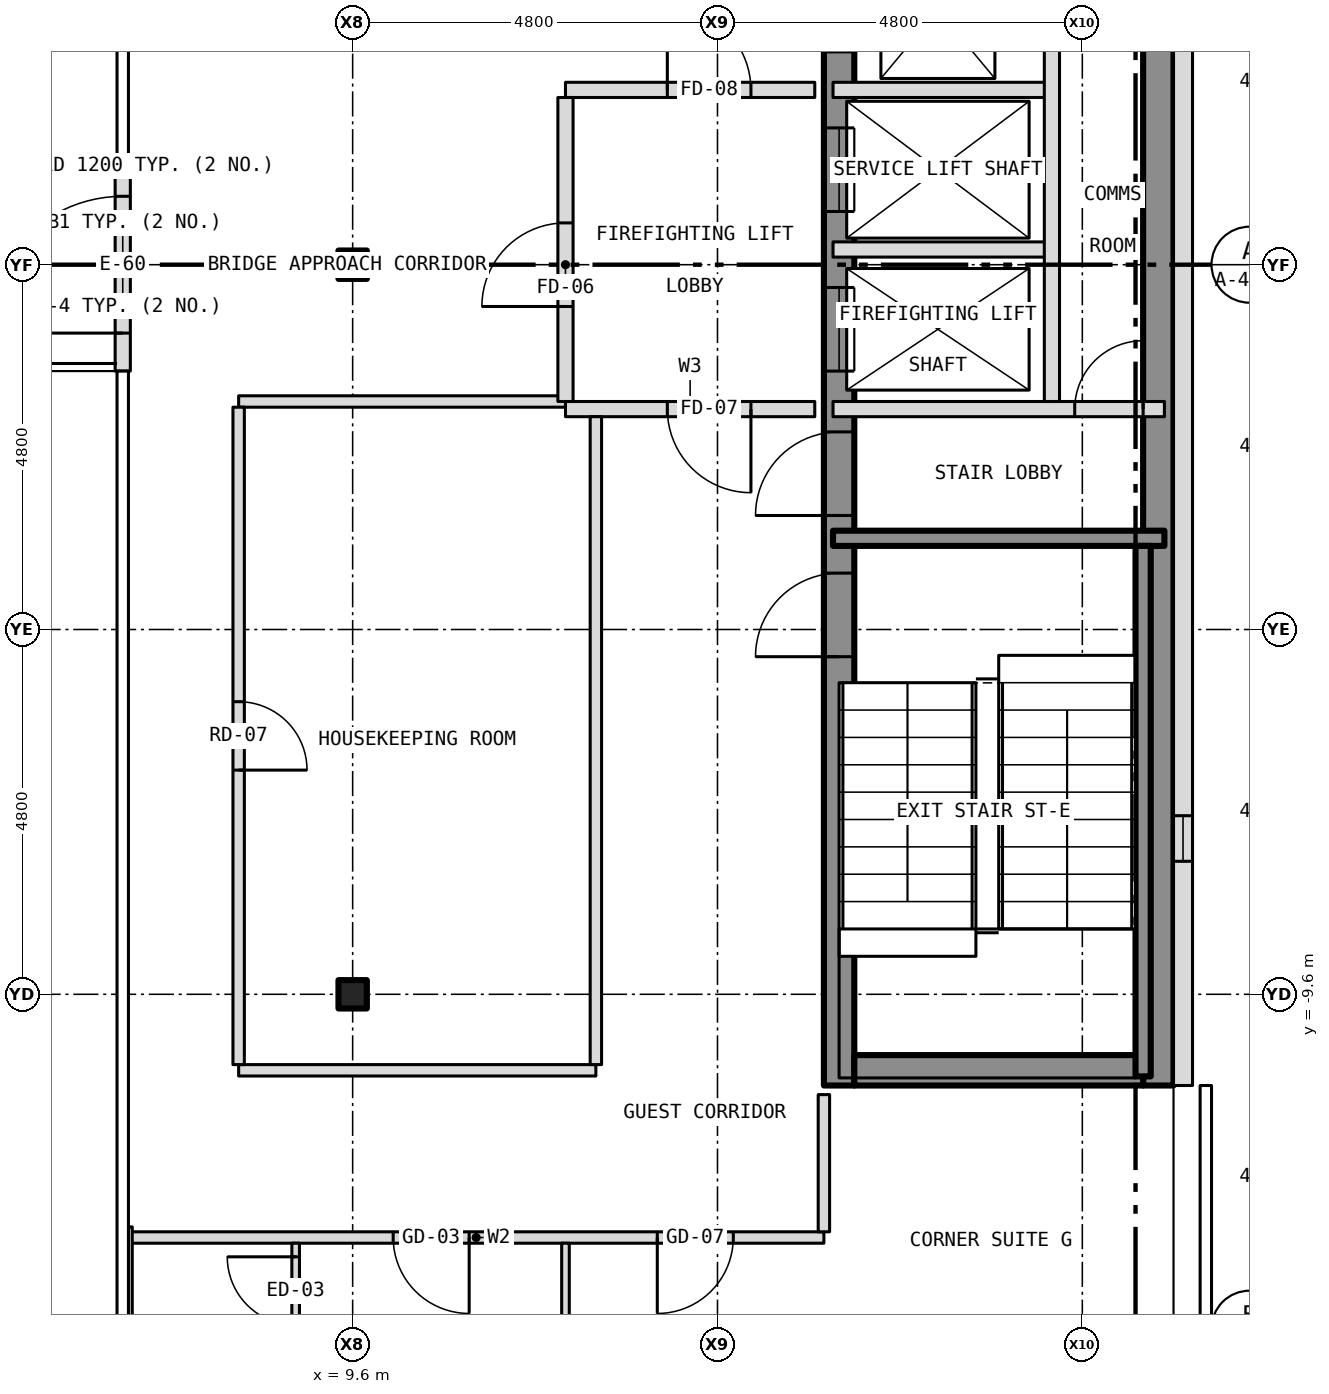
"""IFC4 building model, lengths in metres.
Left out: names, types, materials, properties, quantities, classifications, styles, units other than length and angle.
Written with IfcOpenShell. Run it as: python <this file> out.ifc"""

import sys

from ifc_helpers import new_model, si_unit, direction, frame, frame_2d, origin, origin_2d, place, context, subcontext, project, spatial, rectangle, i_section, extrude, element, fill, save


model = new_model("IFC4")
c1 = context("Model", 3, precision=1e-05, world=origin(), true_north=direction((0.0, 1.0)))
c2 = subcontext(c1, "Body", "Model", "MODEL_VIEW")
j1 = project(units=[si_unit("LENGTHUNIT", "METRE"), si_unit("PLANEANGLEUNIT", "RADIAN")], contexts=[c1])
p1 = place(None, origin())
s1 = spatial("IfcSite", under=j1, at=p1, CompositionType="ELEMENT")
p2 = place(p1, origin())
s2 = spatial("IfcBuilding", under=s1, at=p2, CompositionType="ELEMENT")
p3 = place(p2, frame((0.0, 0.0, 226.0)))
s3 = spatial("IfcBuildingStorey", under=s2, at=p3, CompositionType="ELEMENT", Elevation=226.0)
for number, where, z_axis, x_axis in (
    (1, (9.6, -9.6, -0.15), (0.0, 0.0, 1.0), (1.0, 0.0, 0.0)),
    (2, (9.6, 0.0, -0.15), (0.0, 0.0, 1.0), (1.0, 0.0, 0.0)),
):
    element("IfcColumn", number, at=place(p3, frame(where, z_axis=z_axis, x_axis=x_axis)), inside=s3, PredefinedType="COLUMN", context=c2, shape_type="SweptSolid", body=[
        extrude(i_section(OverallWidth=0.373, OverallDepth=0.373, WebThickness=0.016, FlangeThickness=0.026, at=origin_2d()), origin(), (0.0, 0.0, 1.0), 3.5),
    ])
p4 = place(p3, frame((16.0, -10.8, 0.0), z_axis=(0.0, 0.0, 1.0), x_axis=(0.0, 1.0, 0.0)))
e3 = element("IfcWall", 3, at=p4, inside=s3, PredefinedType="SHEAR", context=c2, shape_type="SweptSolid", body=[
    extrude(rectangle(XDim=21.6, YDim=0.4, at=frame_2d((10.8, 0.0))), origin(), (0.0, 0.0, 1.0), 3.25),
])
p5 = place(p4, frame((9.4, 0.0, 0.0)))
e4 = element("IfcOpeningElement", 4, at=p5, cuts=e3, PredefinedType="OPENING", context=c2, shape_type="SweptSolid", body=[
    extrude(rectangle(XDim=1.1, YDim=2.1, at=frame_2d((0.55, 1.05))), frame((0.0, 0.212, 0.0), z_axis=(0.0, -1.0, 0.0), x_axis=(1.0, 0.0, 0.0)), (0.0, 0.0, 1.0), 0.424),
])
p6 = place(p4, frame((11.5, 0.0, 0.0)))
e5 = element("IfcOpeningElement", 5, at=p6, cuts=e3, PredefinedType="OPENING", context=c2, shape_type="SweptSolid", body=[
    extrude(rectangle(XDim=1.1, YDim=2.1, at=frame_2d((0.55, 1.05))), frame((0.0, 0.212, 0.0), z_axis=(0.0, -1.0, 0.0), x_axis=(1.0, 0.0, 0.0)), (0.0, 0.0, 1.0), 0.424),
])
p7 = place(p4, frame((13.6, 0.0, 0.0)))
e6 = element("IfcOpeningElement", 6, at=p7, cuts=e3, PredefinedType="OPENING", context=c2, shape_type="SweptSolid", body=[
    extrude(rectangle(XDim=1.1, YDim=2.1, at=frame_2d((0.55, 1.05))), frame((0.0, 0.212, 0.0), z_axis=(0.0, -1.0, 0.0), x_axis=(1.0, 0.0, 0.0)), (0.0, 0.0, 1.0), 0.424),
])
p8 = place(p4, frame((15.7, 0.0, 0.0)))
e7 = element("IfcOpeningElement", 7, at=p8, cuts=e3, PredefinedType="OPENING", context=c2, shape_type="SweptSolid", body=[
    extrude(rectangle(XDim=1.1, YDim=2.1, at=frame_2d((0.55, 1.05))), frame((0.0, 0.212, 0.0), z_axis=(0.0, -1.0, 0.0), x_axis=(1.0, 0.0, 0.0)), (0.0, 0.0, 1.0), 0.424),
])
p9 = place(p4, frame((17.8, 0.0, 0.0)))
e8 = element("IfcOpeningElement", 8, at=p9, cuts=e3, PredefinedType="OPENING", context=c2, shape_type="SweptSolid", body=[
    extrude(rectangle(XDim=1.1, YDim=2.1, at=frame_2d((0.55, 1.05))), frame((0.0, 0.212, 0.0), z_axis=(0.0, -1.0, 0.0), x_axis=(1.0, 0.0, 0.0)), (0.0, 0.0, 1.0), 0.424),
])
p10 = place(p4, frame((5.642, 0.0, 0.0)))
e9 = element("IfcOpeningElement", 9, at=p10, cuts=e3, PredefinedType="OPENING", context=c2, shape_type="SweptSolid", body=[
    extrude(rectangle(XDim=1.1, YDim=2.1, at=frame_2d((0.55, 1.05))), frame((0.0, 0.212, 0.0), z_axis=(0.0, -1.0, 0.0), x_axis=(1.0, 0.0, 0.0)), (0.0, 0.0, 1.0), 0.424),
])
p11 = place(p4, frame((7.5, 0.0, 0.0)))
e10 = element("IfcOpeningElement", 10, at=p11, cuts=e3, PredefinedType="OPENING", context=c2, shape_type="SweptSolid", body=[
    extrude(rectangle(XDim=1.1, YDim=2.1, at=frame_2d((0.55, 1.05))), frame((0.0, 0.212, 0.0), z_axis=(0.0, -1.0, 0.0), x_axis=(1.0, 0.0, 0.0)), (0.0, 0.0, 1.0), 0.424),
])
p12 = place(p4, frame((20.0, 0.0, 0.0)))
e11 = element("IfcOpeningElement", 11, at=p12, cuts=e3, PredefinedType="OPENING", context=c2, shape_type="SweptSolid", body=[
    extrude(rectangle(XDim=0.9, YDim=2.1, at=frame_2d((0.45, 1.05))), frame((0.0, 0.212, 0.0), z_axis=(0.0, -1.0, 0.0), x_axis=(1.0, 0.0, 0.0)), (0.0, 0.0, 1.0), 0.424),
])
p13 = place(p3, frame((20.2, -10.8, 0.0), z_axis=(0.0, 0.0, 1.0), x_axis=(0.0, 1.0, 0.0)))
e12 = element("IfcWall", 12, at=p13, inside=s3, PredefinedType="SHEAR", context=c2, shape_type="SweptSolid", body=[
    extrude(rectangle(XDim=21.6, YDim=0.4, at=frame_2d((10.8, 0.0))), origin(), (0.0, 0.0, 1.0), 3.25),
])
p14 = place(p3, frame((16.2, -10.6, 0.0), z_axis=(0.0, 0.0, 1.0), x_axis=(1.0, 0.0, 0.0)))
e13 = element("IfcWall", 13, at=p14, inside=s3, PredefinedType="SHEAR", context=c2, shape_type="SweptSolid", body=[
    extrude(rectangle(XDim=3.8, YDim=0.4, at=frame_2d((1.9, 0.0))), origin(), (0.0, 0.0, 1.0), 3.25),
])
p15 = place(p3, frame((20.525, -10.8, 0.0), z_axis=(0.0, 0.0, 1.0), x_axis=(0.0, 1.0, 0.0)))
e14 = element("IfcWall", 14, at=p15, inside=s3, PredefinedType="SOLIDWALL", context=c2, shape_type="SweptSolid", body=[
    extrude(rectangle(XDim=21.6, YDim=0.25, at=frame_2d((10.8, 0.0))), origin(), (0.0, 0.0, 1.0), 3.5),
])
p16 = place(p15, frame((2.95, 0.0, 1.0)))
e15 = element("IfcOpeningElement", 15, at=p16, cuts=e14, PredefinedType="OPENING", context=c2, shape_type="SweptSolid", body=[
    extrude(rectangle(XDim=0.6, YDim=1.5, at=frame_2d((0.3, 0.75))), frame((0.0, 0.137, 0.0), z_axis=(0.0, -1.0, 0.0), x_axis=(1.0, 0.0, 0.0)), (0.0, 0.0, 1.0), 0.274),
])
p17 = place(p3, frame((6.575, -1.4, 0.0), z_axis=(0.0, 0.0, 1.0), x_axis=(0.0, 1.0, 0.0)))
e16 = element("IfcWall", 16, at=p17, inside=s3, PredefinedType="SOLIDWALL", context=c2, shape_type="SweptSolid", body=[
    extrude(rectangle(XDim=2.8, YDim=0.2, at=frame_2d((1.4, 0.0))), origin(), (0.0, 0.0, 1.0), 3.5),
])
p18 = place(p17, frame((0.5, 0.0, 0.0)))
e17 = element("IfcOpeningElement", 17, at=p18, cuts=e16, PredefinedType="OPENING", context=c2, shape_type="SweptSolid", body=[
    extrude(rectangle(XDim=1.8, YDim=2.1, at=frame_2d((0.9, 1.05))), frame((0.0, 0.112, 0.0), z_axis=(0.0, -1.0, 0.0), x_axis=(1.0, 0.0, 0.0)), (0.0, 0.0, 1.0), 0.224),
])
p19 = place(p3, frame((6.65, -12.8, 0.0), z_axis=(0.0, 0.0, 1.0), x_axis=(1.0, 0.0, 0.0)))
e18 = element("IfcWall", 18, at=p19, inside=s3, PredefinedType="PARTITIONING", context=c2, shape_type="SweptSolid", body=[
    extrude(rectangle(XDim=9.15, YDim=0.15, at=frame_2d((4.575, 0.0))), origin(), (0.0, 0.0, 1.0), 3.35),
])
p20 = place(p19, frame((3.483, 0.0, 0.0)))
e19 = element("IfcOpeningElement", 19, at=p20, cuts=e18, PredefinedType="OPENING", context=c2, shape_type="SweptSolid", body=[
    extrude(rectangle(XDim=1.0, YDim=2.1, at=frame_2d((0.5, 1.05))), frame((0.0, 0.087, 0.0), z_axis=(0.0, -1.0, 0.0), x_axis=(1.0, 0.0, 0.0)), (0.0, 0.0, 1.0), 0.174),
])
p21 = place(p19, frame((6.958, 0.0, 0.0)))
e20 = element("IfcOpeningElement", 20, at=p21, cuts=e18, PredefinedType="OPENING", context=c2, shape_type="SweptSolid", body=[
    extrude(rectangle(XDim=1.0, YDim=2.1, at=frame_2d((0.5, 1.05))), frame((0.0, 0.087, 0.0), z_axis=(0.0, -1.0, 0.0), x_axis=(1.0, 0.0, 0.0)), (0.0, 0.0, 1.0), 0.174),
])
p22 = place(p3, frame((8.1, -10.6, 0.0), z_axis=(0.0, 0.0, 1.0), x_axis=(1.0, 0.0, 0.0)))
e21 = element("IfcWall", 21, at=p22, inside=s3, PredefinedType="PARTITIONING", context=c2, shape_type="SweptSolid", body=[
    extrude(rectangle(XDim=4.7, YDim=0.15, at=frame_2d((2.35, 0.0))), origin(), (0.0, 0.0, 1.0), 3.35),
])
p23 = place(p3, frame((15.92, -3.6, 0.0), z_axis=(0.0, 0.0, 1.0), x_axis=(1.0, 0.0, 0.0)))
e22 = element("IfcWall", 22, at=p23, inside=s3, PredefinedType="SHEAR", context=c2, shape_type="SweptSolid", body=[
    extrude(rectangle(XDim=4.36, YDim=0.2, at=frame_2d((2.18, 0.0))), origin(), (0.0, 0.0, 1.0), 3.25),
])
p24 = place(p3, frame((12.4, -1.9, 0.0), z_axis=(0.0, 0.0, 1.0), x_axis=(1.0, 0.0, 0.0)))
e23 = element("IfcWall", 23, at=p24, inside=s3, PredefinedType="PARTITIONING", context=c2, shape_type="SweptSolid", body=[
    extrude(rectangle(XDim=3.28, YDim=0.2, at=frame_2d((1.64, 0.0))), origin(), (0.0, 0.0, 1.0), 3.35),
])
p25 = place(p24, frame((1.34, 0.0, 0.0)))
e24 = element("IfcOpeningElement", 24, at=p25, cuts=e23, PredefinedType="OPENING", context=c2, shape_type="SweptSolid", body=[
    extrude(rectangle(XDim=1.1, YDim=2.1, at=frame_2d((0.55, 1.05))), frame((0.0, 0.112, 0.0), z_axis=(0.0, -1.0, 0.0), x_axis=(1.0, 0.0, 0.0)), (0.0, 0.0, 1.0), 0.224),
])
p26 = place(p3, frame((15.92, -1.9, 0.0), z_axis=(0.0, 0.0, 1.0), x_axis=(1.0, 0.0, 0.0)))
e25 = element("IfcWall", 25, at=p26, inside=s3, PredefinedType="PARTITIONING", context=c2, shape_type="SweptSolid", body=[
    extrude(rectangle(XDim=4.36, YDim=0.2, at=frame_2d((2.18, 0.0))), origin(), (0.0, 0.0, 1.0), 3.25),
])
p27 = place(p26, frame((3.18, 0.0, 0.0)))
e26 = element("IfcOpeningElement", 26, at=p27, cuts=e25, PredefinedType="OPENING", context=c2, shape_type="SweptSolid", body=[
    extrude(rectangle(XDim=0.9, YDim=2.1, at=frame_2d((0.45, 1.05))), frame((0.0, 0.112, 0.0), z_axis=(0.0, -1.0, 0.0), x_axis=(1.0, 0.0, 0.0)), (0.0, 0.0, 1.0), 0.224),
])
p28 = place(p3, frame((8.1, -1.8, 0.0), z_axis=(0.0, 0.0, 1.0), x_axis=(1.0, 0.0, 0.0)))
e27 = element("IfcWall", 27, at=p28, inside=s3, PredefinedType="PARTITIONING", context=c2, shape_type="SweptSolid", body=[
    extrude(rectangle(XDim=4.3, YDim=0.15, at=frame_2d((2.15, 0.0))), origin(), (0.0, 0.0, 1.0), 3.35),
])
p29 = place(p3, frame((15.92, 0.2, 0.0), z_axis=(0.0, 0.0, 1.0), x_axis=(1.0, 0.0, 0.0)))
e28 = element("IfcWall", 28, at=p29, inside=s3, PredefinedType="PARTITIONING", context=c2, shape_type="SweptSolid", body=[
    extrude(rectangle(XDim=2.88, YDim=0.2, at=frame_2d((1.44, 0.0))), origin(), (0.0, 0.0, 1.0), 3.25),
])
p30 = place(p3, frame((12.4, 2.3, 0.0), z_axis=(0.0, 0.0, 1.0), x_axis=(1.0, 0.0, 0.0)))
e29 = element("IfcWall", 29, at=p30, inside=s3, PredefinedType="PARTITIONING", context=c2, shape_type="SweptSolid", body=[
    extrude(rectangle(XDim=3.28, YDim=0.2, at=frame_2d((1.64, 0.0))), origin(), (0.0, 0.0, 1.0), 3.35),
])
p31 = place(p30, frame((1.34, 0.0, 0.0)))
e30 = element("IfcOpeningElement", 30, at=p31, cuts=e29, PredefinedType="OPENING", context=c2, shape_type="SweptSolid", body=[
    extrude(rectangle(XDim=1.1, YDim=2.1, at=frame_2d((0.55, 1.05))), frame((0.0, 0.112, 0.0), z_axis=(0.0, -1.0, 0.0), x_axis=(1.0, 0.0, 0.0)), (0.0, 0.0, 1.0), 0.224),
])
p32 = place(p3, frame((15.92, 2.3, 0.0), z_axis=(0.0, 0.0, 1.0), x_axis=(1.0, 0.0, 0.0)))
e31 = element("IfcWall", 31, at=p32, inside=s3, PredefinedType="PARTITIONING", context=c2, shape_type="SweptSolid", body=[
    extrude(rectangle(XDim=2.88, YDim=0.2, at=frame_2d((1.44, 0.0))), origin(), (0.0, 0.0, 1.0), 3.25),
])
p33 = place(p3, frame((6.65, -16.14, 0.0), z_axis=(0.0, 0.0, 1.0), x_axis=(0.0, 1.0, 0.0)))
e32 = element("IfcWall", 32, at=p33, inside=s3, PredefinedType="PARTITIONING", context=c2, shape_type="SweptSolid", body=[
    extrude(rectangle(XDim=3.48, YDim=0.1, at=frame_2d((1.74, 0.0))), origin(), (0.0, 0.0, 1.0), 3.35),
])
p34 = place(p3, frame((8.1, -10.525, 0.0), z_axis=(0.0, 0.0, 1.0), x_axis=(0.0, 1.0, 0.0)))
e33 = element("IfcWall", 33, at=p34, inside=s3, PredefinedType="PARTITIONING", context=c2, shape_type="SweptSolid", body=[
    extrude(rectangle(XDim=8.65, YDim=0.15, at=frame_2d((4.325, 0.0))), origin(), (0.0, 0.0, 1.0), 3.35),
])
p35 = place(p34, frame((3.875, 0.0, 0.0)))
e34 = element("IfcOpeningElement", 34, at=p35, cuts=e33, PredefinedType="OPENING", context=c2, shape_type="SweptSolid", body=[
    extrude(rectangle(XDim=0.9, YDim=2.1, at=frame_2d((0.45, 1.05))), frame((0.0, 0.087, 0.0), z_axis=(0.0, -1.0, 0.0), x_axis=(1.0, 0.0, 0.0)), (0.0, 0.0, 1.0), 0.174),
])
p36 = place(p3, frame((8.85, -15.95, 0.0), z_axis=(0.0, 0.0, 1.0), x_axis=(0.0, 1.0, 0.0)))
e35 = element("IfcWall", 35, at=p36, inside=s3, PredefinedType="PARTITIONING", context=c2, shape_type="SweptSolid", body=[
    extrude(rectangle(XDim=3.075, YDim=0.1, at=frame_2d((1.538, 0.0))), origin(), (0.0, 0.0, 1.0), 3.35),
])
p37 = place(p36, frame((1.996, 0.0, 0.0)))
e36 = element("IfcOpeningElement", 36, at=p37, cuts=e35, PredefinedType="OPENING", context=c2, shape_type="SweptSolid", body=[
    extrude(rectangle(XDim=0.9, YDim=2.1, at=frame_2d((0.45, 1.05))), frame((0.0, 0.062, 0.0), z_axis=(0.0, -1.0, 0.0), x_axis=(1.0, 0.0, 0.0)), (0.0, 0.0, 1.0), 0.124),
])
p38 = place(p3, frame((12.4, -20.78, 0.0), z_axis=(0.0, 0.0, 1.0), x_axis=(0.0, 1.0, 0.0)))
e37 = element("IfcWall", 37, at=p38, inside=s3, PredefinedType="PARTITIONING", context=c2, shape_type="SweptSolid", body=[
    extrude(rectangle(XDim=7.905, YDim=0.1, at=frame_2d((3.953, 0.0))), origin(), (0.0, 0.0, 1.0), 3.35),
])
p39 = place(p3, frame((12.4, -1.8, 0.0), z_axis=(0.0, 0.0, 1.0), x_axis=(0.0, 1.0, 0.0)))
e38 = element("IfcWall", 38, at=p39, inside=s3, PredefinedType="PARTITIONING", context=c2, shape_type="SweptSolid", body=[
    extrude(rectangle(XDim=4.0, YDim=0.2, at=frame_2d((2.0, 0.0))), origin(), (0.0, 0.0, 1.0), 3.35),
])
p40 = place(p39, frame((1.25, 0.0, 0.0)))
e39 = element("IfcOpeningElement", 39, at=p40, cuts=e38, PredefinedType="OPENING", context=c2, shape_type="SweptSolid", body=[
    extrude(rectangle(XDim=1.1, YDim=2.1, at=frame_2d((0.55, 1.05))), frame((0.0, 0.112, 0.0), z_axis=(0.0, -1.0, 0.0), x_axis=(1.0, 0.0, 0.0)), (0.0, 0.0, 1.0), 0.224),
])
p41 = place(p3, frame((12.8, -10.525, 0.0), z_axis=(0.0, 0.0, 1.0), x_axis=(0.0, 1.0, 0.0)))
e40 = element("IfcWall", 40, at=p41, inside=s3, PredefinedType="PARTITIONING", context=c2, shape_type="SweptSolid", body=[
    extrude(rectangle(XDim=8.525, YDim=0.15, at=frame_2d((4.262, 0.0))), origin(), (0.0, 0.0, 1.0), 3.35),
])
p42 = place(p3, frame((15.8, -12.725, 0.0), z_axis=(0.0, 0.0, 1.0), x_axis=(0.0, 1.0, 0.0)))
e41 = element("IfcWall", 41, at=p42, inside=s3, PredefinedType="PARTITIONING", context=c2, shape_type="SweptSolid", body=[
    extrude(rectangle(XDim=1.805, YDim=0.15, at=frame_2d((0.903, 0.0))), origin(), (0.0, 0.0, 1.0), 3.35),
])
p43 = place(p3, frame((18.8, -1.8, 0.0), z_axis=(0.0, 0.0, 1.0), x_axis=(0.0, 1.0, 0.0)))
e42 = element("IfcWall", 42, at=p43, inside=s3, PredefinedType="PARTITIONING", context=c2, shape_type="SweptSolid", body=[
    extrude(rectangle(XDim=10.3, YDim=0.2, at=frame_2d((5.15, 0.0))), origin(), (0.0, 0.0, 1.0), 3.25),
])
p44 = place(p3, frame((20.0, -10.68, 0.0), z_axis=(0.0, 0.0, 1.0), x_axis=(0.0, 1.0, 0.0)))
e43 = element("IfcWall", 43, at=p44, inside=s3, PredefinedType="SHEAR", context=c2, shape_type="SweptSolid", body=[
    extrude(rectangle(XDim=6.98, YDim=0.2, at=frame_2d((3.49, 0.0))), origin(), (0.0, 0.0, 1.0), 3.25),
])
p45 = place(p16, origin())
e44 = element("IfcWindow", 44, at=p45, inside=s3, PartitioningType="SINGLE_PANEL", PredefinedType="WINDOW", context=c2, shape_type="SweptSolid", body=[
    extrude(rectangle(XDim=0.6, YDim=1.5, at=frame_2d((0.3, 0.75))), frame((0.0, -0.035, 0.0), z_axis=(0.0, -1.0, 0.0), x_axis=(1.0, 0.0, 0.0)), (0.0, 0.0, 1.0), 0.06),
])
fill(e15, e44)
p46 = place(p18, origin())
e45 = element("IfcDoor", 45, at=p46, inside=s3, OperationType="DOUBLE_DOOR_DOUBLE_SWING", PredefinedType="DOOR", context=c2, shape_type="SweptSolid", body=[
    extrude(rectangle(XDim=1.8, YDim=2.1, at=frame_2d((0.9, 1.05))), frame((0.0, 0.025, 0.0), z_axis=(0.0, -1.0, 0.0), x_axis=(1.0, 0.0, 0.0)), (0.0, 0.0, 1.0), 0.05),
])
fill(e17, e45)
p47 = place(p5, origin())
e46 = element("IfcDoor", 46, at=p47, inside=s3, OperationType="SLIDING_TO_LEFT", PredefinedType="DOOR", context=c2, shape_type="SweptSolid", body=[
    extrude(rectangle(XDim=1.1, YDim=2.1, at=frame_2d((0.55, 1.05))), frame((0.0, 0.025, 0.0), z_axis=(0.0, -1.0, 0.0), x_axis=(1.0, 0.0, 0.0)), (0.0, 0.0, 1.0), 0.05),
])
fill(e4, e46)
p48 = place(p6, origin())
e47 = element("IfcDoor", 47, at=p48, inside=s3, OperationType="SLIDING_TO_LEFT", PredefinedType="DOOR", context=c2, shape_type="SweptSolid", body=[
    extrude(rectangle(XDim=1.1, YDim=2.1, at=frame_2d((0.55, 1.05))), frame((0.0, 0.025, 0.0), z_axis=(0.0, -1.0, 0.0), x_axis=(1.0, 0.0, 0.0)), (0.0, 0.0, 1.0), 0.05),
])
fill(e5, e47)
p49 = place(p10, origin())
e48 = element("IfcDoor", 48, at=p49, inside=s3, OperationType="SINGLE_SWING_LEFT", PredefinedType="DOOR", context=c2, shape_type="SweptSolid", body=[
    extrude(rectangle(XDim=1.1, YDim=2.1, at=frame_2d((0.55, 1.05))), frame((0.0, 0.025, 0.0), z_axis=(0.0, -1.0, 0.0), x_axis=(1.0, 0.0, 0.0)), (0.0, 0.0, 1.0), 0.05),
])
fill(e9, e48)
p50 = place(p11, origin())
e49 = element("IfcDoor", 49, at=p50, inside=s3, OperationType="SINGLE_SWING_LEFT", PredefinedType="DOOR", context=c2, shape_type="SweptSolid", body=[
    extrude(rectangle(XDim=1.1, YDim=2.1, at=frame_2d((0.55, 1.05))), frame((0.0, 0.025, 0.0), z_axis=(0.0, -1.0, 0.0), x_axis=(1.0, 0.0, 0.0)), (0.0, 0.0, 1.0), 0.05),
])
fill(e10, e49)
p51 = place(p27, origin())
e50 = element("IfcDoor", 50, at=p51, inside=s3, OperationType="SINGLE_SWING_RIGHT", PredefinedType="DOOR", context=c2, shape_type="SweptSolid", body=[
    extrude(rectangle(XDim=0.9, YDim=2.1, at=frame_2d((0.45, 1.05))), frame((0.0, 0.025, 0.0), z_axis=(0.0, -1.0, 0.0), x_axis=(1.0, 0.0, 0.0)), (0.0, 0.0, 1.0), 0.05),
])
fill(e26, e50)
p52 = place(p40, origin())
e51 = element("IfcDoor", 51, at=p52, inside=s3, OperationType="SINGLE_SWING_LEFT", PredefinedType="DOOR", context=c2, shape_type="SweptSolid", body=[
    extrude(rectangle(XDim=1.1, YDim=2.1, at=frame_2d((0.55, 1.05))), frame((0.0, 0.025, 0.0), z_axis=(0.0, -1.0, 0.0), x_axis=(1.0, 0.0, 0.0)), (0.0, 0.0, 1.0), 0.05),
])
fill(e39, e51)
p53 = place(p25, origin())
e52 = element("IfcDoor", 52, at=p53, inside=s3, OperationType="SINGLE_SWING_RIGHT", PredefinedType="DOOR", context=c2, shape_type="SweptSolid", body=[
    extrude(rectangle(XDim=1.1, YDim=2.1, at=frame_2d((0.55, 1.05))), frame((0.0, 0.025, 0.0), z_axis=(0.0, -1.0, 0.0), x_axis=(1.0, 0.0, 0.0)), (0.0, 0.0, 1.0), 0.05),
])
fill(e24, e52)
p54 = place(p31, origin())
e53 = element("IfcDoor", 53, at=p54, inside=s3, OperationType="SINGLE_SWING_LEFT", PredefinedType="DOOR", context=c2, shape_type="SweptSolid", body=[
    extrude(rectangle(XDim=1.1, YDim=2.1, at=frame_2d((0.55, 1.05))), frame((0.0, 0.025, 0.0), z_axis=(0.0, -1.0, 0.0), x_axis=(1.0, 0.0, 0.0)), (0.0, 0.0, 1.0), 0.05),
])
fill(e30, e53)
p55 = place(p20, origin())
e54 = element("IfcDoor", 54, at=p55, inside=s3, OperationType="SINGLE_SWING_RIGHT", PredefinedType="DOOR", context=c2, shape_type="SweptSolid", body=[
    extrude(rectangle(XDim=1.0, YDim=2.1, at=frame_2d((0.5, 1.05))), frame((0.0, 0.025, 0.0), z_axis=(0.0, -1.0, 0.0), x_axis=(1.0, 0.0, 0.0)), (0.0, 0.0, 1.0), 0.05),
])
fill(e19, e54)
p56 = place(p37, origin())
e55 = element("IfcDoor", 55, at=p56, inside=s3, OperationType="SINGLE_SWING_RIGHT", PredefinedType="DOOR", context=c2, shape_type="SweptSolid", body=[
    extrude(rectangle(XDim=0.9, YDim=2.1, at=frame_2d((0.45, 1.05))), frame((0.0, 0.025, 0.0), z_axis=(0.0, -1.0, 0.0), x_axis=(1.0, 0.0, 0.0)), (0.0, 0.0, 1.0), 0.05),
])
fill(e36, e55)
p57 = place(p21, origin())
e56 = element("IfcDoor", 56, at=p57, inside=s3, OperationType="SINGLE_SWING_LEFT", PredefinedType="DOOR", context=c2, shape_type="SweptSolid", body=[
    extrude(rectangle(XDim=1.0, YDim=2.1, at=frame_2d((0.5, 1.05))), frame((0.0, 0.025, 0.0), z_axis=(0.0, -1.0, 0.0), x_axis=(1.0, 0.0, 0.0)), (0.0, 0.0, 1.0), 0.05),
])
fill(e20, e56)
p58 = place(p35, origin())
e57 = element("IfcDoor", 57, at=p58, inside=s3, OperationType="SINGLE_SWING_LEFT", PredefinedType="DOOR", context=c2, shape_type="SweptSolid", body=[
    extrude(rectangle(XDim=0.9, YDim=2.1, at=frame_2d((0.45, 1.05))), frame((0.0, 0.025, 0.0), z_axis=(0.0, -1.0, 0.0), x_axis=(1.0, 0.0, 0.0)), (0.0, 0.0, 1.0), 0.05),
])
fill(e34, e57)
save(model, sys.argv[1])
